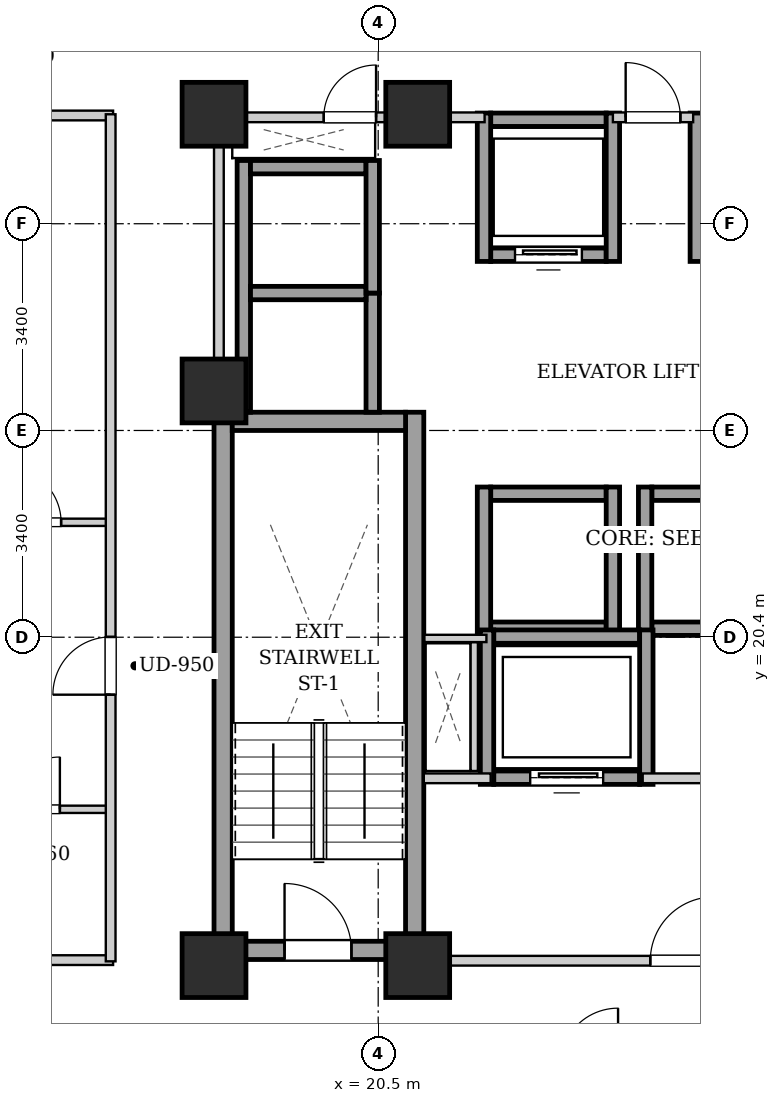
"""IFC4 building model, lengths in metres.
Left out: names, types, materials, properties, quantities, classifications, styles, units other than length and angle.
Written with IfcOpenShell. Run it as: python <this file> out.ifc"""

import sys

from ifc_helpers import new_model, si_unit, direction, frame, frame_2d, origin, origin_2d, place, context, subcontext, project, spatial, rectangle, extrude, element, fill, save


model = new_model("IFC4")
c1 = context("Model", 3, precision=1e-05, world=origin(), true_north=direction((0.0, 1.0)))
c2 = subcontext(c1, "Body", "Model", "MODEL_VIEW")
j1 = project(units=[si_unit("LENGTHUNIT", "METRE"), si_unit("PLANEANGLEUNIT", "RADIAN")], contexts=[c1])
p1 = place(None, origin())
s1 = spatial("IfcSite", under=j1, at=p1, CompositionType="ELEMENT")
p2 = place(p1, origin())
s2 = spatial("IfcBuilding", under=s1, at=p2, CompositionType="ELEMENT")
p3 = place(p2, frame((0.0, 0.0, 84.7)))
s3 = spatial("IfcBuildingStorey", under=s2, at=p3, CompositionType="ELEMENT", Elevation=84.7)
for number, where, z_axis, x_axis in (
    (1, (17.8, 15.0, 0.0), (0.0, 0.0, 1.0), (1.0, 0.0, 0.0)),
    (2, (21.15, 15.0, 0.0), (0.0, 0.0, 1.0), (1.0, 0.0, 0.0)),
    (3, (17.8, 29.0, 0.0), (0.0, 0.0, 1.0), (1.0, 0.0, 0.0)),
    (4, (21.15, 29.0, 0.0), (0.0, 0.0, 1.0), (1.0, 0.0, 0.0)),
    (5, (17.8, 24.45, 0.0), (0.0, 0.0, 1.0), (1.0, 0.0, 0.0)),
):
    element("IfcColumn", number, at=place(p3, frame(where, z_axis=z_axis, x_axis=x_axis)), inside=s3, PredefinedType="COLUMN", context=c2, shape_type="SweptSolid", body=[
        extrude(rectangle(XDim=1.05, YDim=1.05, at=origin_2d()), origin(), (0.0, 0.0, 1.0), 3.2),
    ])
for number, where, z_axis, x_axis in (
    (6, (17.95, 15.1, 0.0), (0.0, 0.0, 1.0), (0.0, 1.0, 0.0)),
    (7, (21.1, 15.1, 0.0), (0.0, 0.0, 1.0), (0.0, 1.0, 0.0)),
):
    element("IfcWall", number, at=place(p3, frame(where, z_axis=z_axis, x_axis=x_axis)), inside=s3, PredefinedType="SHEAR", context=c2, shape_type="SweptSolid", body=[
        extrude(rectangle(XDim=9.0, YDim=0.3, at=frame_2d((4.5, 0.0))), origin(), (0.0, 0.0, 1.0), 2.94),
    ])
p4 = place(p3, frame((18.1, 23.95, 0.0), z_axis=(0.0, 0.0, 1.0), x_axis=(1.0, 0.0, 0.0)))
e8 = element("IfcWall", 8, at=p4, inside=s3, PredefinedType="SHEAR", context=c2, shape_type="SweptSolid", body=[
    extrude(rectangle(XDim=2.85, YDim=0.3, at=frame_2d((1.425, 0.0))), origin(), (0.0, 0.0, 1.0), 2.94),
])
p5 = place(p3, frame((18.1, 15.25, 0.0), z_axis=(0.0, 0.0, 1.0), x_axis=(1.0, 0.0, 0.0)))
e9 = element("IfcWall", 9, at=p5, inside=s3, PredefinedType="SHEAR", context=c2, shape_type="SweptSolid", body=[
    extrude(rectangle(XDim=2.85, YDim=0.3, at=frame_2d((1.425, 0.0))), origin(), (0.0, 0.0, 1.0), 2.94),
])
p6 = place(p5, frame((0.86, 0.0, 0.0)))
e10 = element("IfcOpeningElement", 10, at=p6, cuts=e9, PredefinedType="OPENING", context=c2, shape_type="SweptSolid", body=[
    extrude(rectangle(XDim=1.1, YDim=2.05, at=frame_2d((0.55, 1.025))), frame((0.0, 0.16, 0.0), z_axis=(0.0, -1.0, 0.0), x_axis=(1.0, 0.0, 0.0)), (0.0, 0.0, 1.0), 0.32),
])
p7 = place(p3, frame((22.35, 26.69, 0.0), z_axis=(0.0, 0.0, 1.0), x_axis=(1.0, 0.0, 0.0)))
e11 = element("IfcWall", 11, at=p7, inside=s3, PredefinedType="SHEAR", context=c2, shape_type="SweptSolid", body=[
    extrude(rectangle(XDim=1.9, YDim=0.22, at=frame_2d((0.95, 0.0))), origin(), (0.0, 0.0, 1.0), 2.94),
])
p8 = place(p7, frame((0.4, 0.0, 0.0)))
e12 = element("IfcOpeningElement", 12, at=p8, cuts=e11, PredefinedType="OPENING", context=c2, shape_type="SweptSolid", body=[
    extrude(rectangle(XDim=1.1, YDim=2.15, at=frame_2d((0.55, 1.075))), frame((0.0, 0.12, 0.0), z_axis=(0.0, -1.0, 0.0), x_axis=(1.0, 0.0, 0.0)), (0.0, 0.0, 1.0), 0.24),
])
p9 = place(p3, frame((22.35, 28.91, 0.0), z_axis=(0.0, 0.0, 1.0), x_axis=(1.0, 0.0, 0.0)))
e13 = element("IfcWall", 13, at=p9, inside=s3, PredefinedType="SHEAR", context=c2, shape_type="SweptSolid", body=[
    extrude(rectangle(XDim=1.9, YDim=0.22, at=frame_2d((0.95, 0.0))), origin(), (0.0, 0.0, 1.0), 2.94),
])
for number, where, z_axis, x_axis in (
    (14, (22.24, 26.58, 0.0), (0.0, 0.0, 1.0), (0.0, 1.0, 0.0)),
    (15, (24.36, 26.58, 0.0), (0.0, 0.0, 1.0), (0.0, 1.0, 0.0)),
    (16, (25.74, 26.58, 0.0), (0.0, 0.0, 1.0), (0.0, 1.0, 0.0)),
):
    element("IfcWall", number, at=place(p3, frame(where, z_axis=z_axis, x_axis=x_axis)), inside=s3, PredefinedType="SHEAR", context=c2, shape_type="SweptSolid", body=[
        extrude(rectangle(XDim=2.44, YDim=0.22, at=frame_2d((1.22, 0.0))), origin(), (0.0, 0.0, 1.0), 2.94),
    ])
for number, where, z_axis, x_axis in (
    (17, (22.35, 20.54, 0.0), (0.0, 0.0, 1.0), (1.0, 0.0, 0.0)),
    (18, (22.35, 22.76, 0.0), (0.0, 0.0, 1.0), (1.0, 0.0, 0.0)),
):
    element("IfcWall", number, at=place(p3, frame(where, z_axis=z_axis, x_axis=x_axis)), inside=s3, PredefinedType="SHEAR", context=c2, shape_type="SweptSolid", body=[
        extrude(rectangle(XDim=1.9, YDim=0.22, at=frame_2d((0.95, 0.0))), origin(), (0.0, 0.0, 1.0), 2.94),
    ])
for number, where, z_axis, x_axis in (
    (19, (22.24, 20.43, 0.0), (0.0, 0.0, 1.0), (0.0, 1.0, 0.0)),
    (20, (24.36, 20.43, 0.0), (0.0, 0.0, 1.0), (0.0, 1.0, 0.0)),
):
    element("IfcWall", number, at=place(p3, frame(where, z_axis=z_axis, x_axis=x_axis)), inside=s3, PredefinedType="SHEAR", context=c2, shape_type="SweptSolid", body=[
        extrude(rectangle(XDim=2.44, YDim=0.22, at=frame_2d((1.22, 0.0))), origin(), (0.0, 0.0, 1.0), 2.94),
    ])
for number, where, z_axis, x_axis in (
    (21, (25.0, 20.54, 0.0), (0.0, 0.0, 1.0), (1.0, 0.0, 0.0)),
    (22, (25.0, 22.76, 0.0), (0.0, 0.0, 1.0), (1.0, 0.0, 0.0)),
):
    element("IfcWall", number, at=place(p3, frame(where, z_axis=z_axis, x_axis=x_axis)), inside=s3, PredefinedType="SHEAR", context=c2, shape_type="SweptSolid", body=[
        extrude(rectangle(XDim=1.9, YDim=0.22, at=frame_2d((0.95, 0.0))), origin(), (0.0, 0.0, 1.0), 2.94),
    ])
p10 = place(p3, frame((24.89, 20.43, 0.0), z_axis=(0.0, 0.0, 1.0), x_axis=(0.0, 1.0, 0.0)))
e23 = element("IfcWall", 23, at=p10, inside=s3, PredefinedType="SHEAR", context=c2, shape_type="SweptSolid", body=[
    extrude(rectangle(XDim=2.44, YDim=0.22, at=frame_2d((1.22, 0.0))), origin(), (0.0, 0.0, 1.0), 2.94),
])
p11 = place(p3, frame((18.29, 24.1, 0.0), z_axis=(0.0, 0.0, 1.0), x_axis=(0.0, 1.0, 0.0)))
e24 = element("IfcWall", 24, at=p11, inside=s3, PredefinedType="SHEAR", context=c2, shape_type="SweptSolid", body=[
    extrude(rectangle(XDim=4.14, YDim=0.22, at=frame_2d((2.07, 0.0))), origin(), (0.0, 0.0, 1.0), 2.94),
])
p12 = place(p3, frame((20.41, 24.1, 0.0), z_axis=(0.0, 0.0, 1.0), x_axis=(0.0, 1.0, 0.0)))
e25 = element("IfcWall", 25, at=p12, inside=s3, PredefinedType="SHEAR", context=c2, shape_type="SweptSolid", body=[
    extrude(rectangle(XDim=1.96, YDim=0.22, at=frame_2d((0.98, 0.0))), origin(), (0.0, 0.0, 1.0), 2.94),
])
for number, where, z_axis, x_axis in (
    (26, (18.4, 26.06, 0.0), (0.0, 0.0, 1.0), (1.0, 0.0, 0.0)),
    (27, (18.4, 28.13, 0.0), (0.0, 0.0, 1.0), (1.0, 0.0, 0.0)),
):
    element("IfcWall", number, at=place(p3, frame(where, z_axis=z_axis, x_axis=x_axis)), inside=s3, PredefinedType="SHEAR", context=c2, shape_type="SweptSolid", body=[
        extrude(rectangle(XDim=1.9, YDim=0.22, at=frame_2d((0.95, 0.0))), origin(), (0.0, 0.0, 1.0), 2.94),
    ])
p13 = place(p3, frame((20.41, 26.06, 0.0), z_axis=(0.0, 0.0, 1.0), x_axis=(0.0, 1.0, 0.0)))
e28 = element("IfcWall", 28, at=p13, inside=s3, PredefinedType="SHEAR", context=c2, shape_type="SweptSolid", body=[
    extrude(rectangle(XDim=2.18, YDim=0.22, at=frame_2d((1.09, 0.0))), origin(), (0.0, 0.0, 1.0), 2.94),
])
p14 = place(p3, frame((22.4, 18.09, 0.0), z_axis=(0.0, 0.0, 1.0), x_axis=(1.0, 0.0, 0.0)))
e29 = element("IfcWall", 29, at=p14, inside=s3, PredefinedType="SHEAR", context=c2, shape_type="SweptSolid", body=[
    extrude(rectangle(XDim=2.4, YDim=0.22, at=frame_2d((1.2, 0.0))), origin(), (0.0, 0.0, 1.0), 2.94),
])
p15 = place(p14, frame((0.6, 0.0, 0.0)))
e30 = element("IfcOpeningElement", 30, at=p15, cuts=e29, PredefinedType="OPENING", context=c2, shape_type="SweptSolid", body=[
    extrude(rectangle(XDim=1.2, YDim=2.15, at=frame_2d((0.6, 1.075))), frame((0.0, 0.12, 0.0), z_axis=(0.0, -1.0, 0.0), x_axis=(1.0, 0.0, 0.0)), (0.0, 0.0, 1.0), 0.24),
])
p16 = place(p3, frame((22.4, 20.41, 0.0), z_axis=(0.0, 0.0, 1.0), x_axis=(1.0, 0.0, 0.0)))
e31 = element("IfcWall", 31, at=p16, inside=s3, PredefinedType="SHEAR", context=c2, shape_type="SweptSolid", body=[
    extrude(rectangle(XDim=2.4, YDim=0.22, at=frame_2d((1.2, 0.0))), origin(), (0.0, 0.0, 1.0), 2.94),
])
for number, where, z_axis, x_axis in (
    (32, (22.29, 17.98, 0.0), (0.0, 0.0, 1.0), (0.0, 1.0, 0.0)),
    (33, (24.91, 17.98, 0.0), (0.0, 0.0, 1.0), (0.0, 1.0, 0.0)),
):
    element("IfcWall", number, at=place(p3, frame(where, z_axis=z_axis, x_axis=x_axis)), inside=s3, PredefinedType="SHEAR", context=c2, shape_type="SweptSolid", body=[
        extrude(rectangle(XDim=2.54, YDim=0.22, at=frame_2d((1.27, 0.0))), origin(), (0.0, 0.0, 1.0), 2.94),
    ])
p17 = place(p3, frame((21.25, 15.08, 0.0), z_axis=(0.0, 0.0, 1.0), x_axis=(1.0, 0.0, 0.0)))
e34 = element("IfcWall", 34, at=p17, inside=s3, PredefinedType="PARTITIONING", context=c2, shape_type="SweptSolid", body=[
    extrude(rectangle(XDim=8.5, YDim=0.16, at=frame_2d((4.25, 0.0))), origin(), (0.0, 0.0, 1.0), 2.309),
])
p18 = place(p17, frame((3.725, 0.0, 0.0)))
e35 = element("IfcOpeningElement", 35, at=p18, cuts=e34, PredefinedType="OPENING", context=c2, shape_type="SweptSolid", body=[
    extrude(rectangle(XDim=1.05, YDim=2.05, at=frame_2d((0.525, 1.025))), frame((0.0, 0.09, 0.0), z_axis=(0.0, -1.0, 0.0), x_axis=(1.0, 0.0, 0.0)), (0.0, 0.0, 1.0), 0.18),
])
p19 = place(p3, frame((21.25, 18.08, 0.0), z_axis=(0.0, 0.0, 1.0), x_axis=(1.0, 0.0, 0.0)))
e36 = element("IfcWall", 36, at=p19, inside=s3, PredefinedType="PARTITIONING", context=c2, shape_type="SweptSolid", body=[
    extrude(rectangle(XDim=1.1, YDim=0.16, at=frame_2d((0.55, 0.0))), origin(), (0.0, 0.0, 1.0), 2.94),
])
p20 = place(p3, frame((24.85, 18.08, 0.0), z_axis=(0.0, 0.0, 1.0), x_axis=(1.0, 0.0, 0.0)))
e37 = element("IfcWall", 37, at=p20, inside=s3, PredefinedType="PARTITIONING", context=c2, shape_type="SweptSolid", body=[
    extrude(rectangle(XDim=1.3, YDim=0.16, at=frame_2d((0.65, 0.0))), origin(), (0.0, 0.0, 1.0), 2.94),
])
p21 = place(p3, frame((17.88, 24.12, 0.0), z_axis=(0.0, 0.0, 1.0), x_axis=(0.0, 1.0, 0.0)))
e38 = element("IfcWall", 38, at=p21, inside=s3, PredefinedType="PARTITIONING", context=c2, shape_type="SweptSolid", body=[
    extrude(rectangle(XDim=4.76, YDim=0.16, at=frame_2d((2.38, 0.0))), origin(), (0.0, 0.0, 1.0), 2.94),
])
p22 = place(p3, frame((24.36, 28.95, 0.0), z_axis=(0.0, 0.0, 1.0), x_axis=(1.0, 0.0, 0.0)))
e39 = element("IfcWall", 39, at=p22, inside=s3, PredefinedType="PARTITIONING", context=c2, shape_type="SweptSolid", body=[
    extrude(rectangle(XDim=1.32, YDim=0.16, at=frame_2d((0.66, 0.0))), origin(), (0.0, 0.0, 1.0), 2.309),
])
p23 = place(p22, frame((0.21, 0.0, 0.0)))
e40 = element("IfcOpeningElement", 40, at=p23, cuts=e39, PredefinedType="OPENING", context=c2, shape_type="SweptSolid", body=[
    extrude(rectangle(XDim=0.9, YDim=2.05, at=frame_2d((0.45, 1.025))), frame((0.0, 0.09, 0.0), z_axis=(0.0, -1.0, 0.0), x_axis=(1.0, 0.0, 0.0)), (0.0, 0.0, 1.0), 0.18),
])
p24 = place(p3, frame((17.96, 28.95, 0.0), z_axis=(0.0, 0.0, 1.0), x_axis=(1.0, 0.0, 0.0)))
e41 = element("IfcWall", 41, at=p24, inside=s3, PredefinedType="PARTITIONING", context=c2, shape_type="SweptSolid", body=[
    extrude(rectangle(XDim=4.29, YDim=0.16, at=frame_2d((2.145, 0.0))), origin(), (0.0, 0.0, 1.0), 2.309),
])
p25 = place(p24, frame((1.645, 0.0, 0.0)))
e42 = element("IfcOpeningElement", 42, at=p25, cuts=e41, PredefinedType="OPENING", context=c2, shape_type="SweptSolid", body=[
    extrude(rectangle(XDim=0.86, YDim=2.05, at=frame_2d((0.43, 1.025))), frame((0.0, 0.09, 0.0), z_axis=(0.0, -1.0, 0.0), x_axis=(1.0, 0.0, 0.0)), (0.0, 0.0, 1.0), 0.18),
])
p26 = place(p3, frame((22.08, 18.2, 0.0), z_axis=(0.0, 0.0, 1.0), x_axis=(0.0, 1.0, 0.0)))
e43 = element("IfcWall", 43, at=p26, inside=s3, PredefinedType="PARTITIONING", context=c2, shape_type="SweptSolid", body=[
    extrude(rectangle(XDim=2.12, YDim=0.12, at=frame_2d((1.06, 0.0))), origin(), (0.0, 0.0, 1.0), 2.94),
])
p27 = place(p3, frame((22.28, 20.38, 0.0), z_axis=(0.0, 0.0, 1.0), x_axis=(-1.0, 0.0, 0.0)))
e44 = element("IfcWall", 44, at=p27, inside=s3, PredefinedType="PARTITIONING", context=c2, shape_type="SweptSolid", body=[
    extrude(rectangle(XDim=1.02, YDim=0.12, at=frame_2d((0.51, 0.0))), origin(), (0.0, 0.0, 1.0), 2.94),
])
for number, where, z_axis, x_axis in (
    (45, (7.78, 15.09, 0.0), (0.0, 0.0, 1.0), (1.0, 0.0, 0.0)),
    (46, (7.78, 28.98, 0.0), (0.0, 0.0, 1.0), (1.0, 0.0, 0.0)),
):
    element("IfcWall", number, at=place(p3, frame(where, z_axis=z_axis, x_axis=x_axis)), inside=s3, PredefinedType="PARTITIONING", context=c2, shape_type="SweptSolid", body=[
        extrude(rectangle(XDim=8.36, YDim=0.16, at=frame_2d((4.18, 0.0))), origin(), (0.0, 0.0, 1.0), 2.309),
    ])
p28 = place(p3, frame((13.61, 22.29, 0.0), z_axis=(0.0, 0.0, 1.0), x_axis=(1.0, 0.0, 0.0)))
e47 = element("IfcWall", 47, at=p28, inside=s3, PredefinedType="PARTITIONING", context=c2, shape_type="SweptSolid", body=[
    extrude(rectangle(XDim=2.45, YDim=0.12, at=frame_2d((1.225, 0.0))), origin(), (0.0, 0.0, 1.0), 2.94),
])
p29 = place(p28, frame((0.775, 0.0, 0.0)))
e48 = element("IfcOpeningElement", 48, at=p29, cuts=e47, PredefinedType="OPENING", context=c2, shape_type="SweptSolid", body=[
    extrude(rectangle(XDim=0.9, YDim=2.05, at=frame_2d((0.45, 1.025))), frame((0.0, 0.07, 0.0), z_axis=(0.0, -1.0, 0.0), x_axis=(1.0, 0.0, 0.0)), (0.0, 0.0, 1.0), 0.14),
])
p30 = place(p3, frame((13.61, 17.57, 0.0), z_axis=(0.0, 0.0, 1.0), x_axis=(1.0, 0.0, 0.0)))
e49 = element("IfcWall", 49, at=p30, inside=s3, PredefinedType="PARTITIONING", context=c2, shape_type="SweptSolid", body=[
    extrude(rectangle(XDim=2.45, YDim=0.12, at=frame_2d((1.225, 0.0))), origin(), (0.0, 0.0, 1.0), 2.94),
])
p31 = place(p30, frame((0.795, 0.0, 0.0)))
e50 = element("IfcOpeningElement", 50, at=p31, cuts=e49, PredefinedType="OPENING", context=c2, shape_type="SweptSolid", body=[
    extrude(rectangle(XDim=0.86, YDim=2.05, at=frame_2d((0.43, 1.025))), frame((0.0, 0.07, 0.0), z_axis=(0.0, -1.0, 0.0), x_axis=(1.0, 0.0, 0.0)), (0.0, 0.0, 1.0), 0.14),
])
p32 = place(p3, frame((16.1, 15.07, 0.0), z_axis=(0.0, 0.0, 1.0), x_axis=(0.0, 1.0, 0.0)))
e51 = element("IfcWall", 51, at=p32, inside=s3, PredefinedType="PARTITIONING", context=c2, shape_type="SweptSolid", body=[
    extrude(rectangle(XDim=13.93, YDim=0.16, at=frame_2d((6.965, 0.0))), origin(), (0.0, 0.0, 1.0), 2.94),
])
p33 = place(p32, frame((4.385, 0.0, 0.0)))
e52 = element("IfcOpeningElement", 52, at=p33, cuts=e51, PredefinedType="OPENING", context=c2, shape_type="SweptSolid", body=[
    extrude(rectangle(XDim=0.95, YDim=2.1, at=frame_2d((0.475, 1.05))), frame((0.0, 0.09, 0.0), z_axis=(0.0, -1.0, 0.0), x_axis=(1.0, 0.0, 0.0)), (0.0, 0.0, 1.0), 0.18),
])
p34 = place(p6, origin())
e53 = element("IfcDoor", 53, at=p34, inside=s3, OperationType="SINGLE_SWING_LEFT", PredefinedType="DOOR", context=c2, shape_type="SweptSolid", body=[
    extrude(rectangle(XDim=1.1, YDim=2.05, at=frame_2d((0.55, 1.025))), frame((0.0, 0.025, 0.0), z_axis=(0.0, -1.0, 0.0), x_axis=(1.0, 0.0, 0.0)), (0.0, 0.0, 1.0), 0.05),
])
fill(e10, e53)
p35 = place(p8, origin())
e54 = element("IfcDoor", 54, at=p35, inside=s3, OperationType="SLIDING_TO_LEFT", PredefinedType="DOOR", context=c2, shape_type="SweptSolid", body=[
    extrude(rectangle(XDim=1.1, YDim=2.15, at=frame_2d((0.55, 1.075))), frame((0.0, 0.025, 0.0), z_axis=(0.0, -1.0, 0.0), x_axis=(1.0, 0.0, 0.0)), (0.0, 0.0, 1.0), 0.05),
])
fill(e12, e54)
p36 = place(p15, origin())
e55 = element("IfcDoor", 55, at=p36, inside=s3, OperationType="SLIDING_TO_LEFT", PredefinedType="DOOR", context=c2, shape_type="SweptSolid", body=[
    extrude(rectangle(XDim=1.2, YDim=2.15, at=frame_2d((0.6, 1.075))), frame((0.0, 0.025, 0.0), z_axis=(0.0, -1.0, 0.0), x_axis=(1.0, 0.0, 0.0)), (0.0, 0.0, 1.0), 0.05),
])
fill(e30, e55)
p37 = place(p18, origin())
e56 = element("IfcDoor", 56, at=p37, inside=s3, OperationType="SINGLE_SWING_RIGHT", PredefinedType="DOOR", context=c2, shape_type="SweptSolid", body=[
    extrude(rectangle(XDim=1.05, YDim=2.05, at=frame_2d((0.525, 1.025))), frame((0.0, 0.025, 0.0), z_axis=(0.0, -1.0, 0.0), x_axis=(1.0, 0.0, 0.0)), (0.0, 0.0, 1.0), 0.05),
])
fill(e35, e56)
p38 = place(p23, origin())
e57 = element("IfcDoor", 57, at=p38, inside=s3, OperationType="SINGLE_SWING_LEFT", PredefinedType="DOOR", context=c2, shape_type="SweptSolid", body=[
    extrude(rectangle(XDim=0.9, YDim=2.05, at=frame_2d((0.45, 1.025))), frame((0.0, 0.025, 0.0), z_axis=(0.0, -1.0, 0.0), x_axis=(1.0, 0.0, 0.0)), (0.0, 0.0, 1.0), 0.05),
])
fill(e40, e57)
p39 = place(p25, origin())
e58 = element("IfcDoor", 58, at=p39, inside=s3, OperationType="SINGLE_SWING_RIGHT", PredefinedType="DOOR", context=c2, shape_type="SweptSolid", body=[
    extrude(rectangle(XDim=0.86, YDim=2.05, at=frame_2d((0.43, 1.025))), frame((0.0, 0.025, 0.0), z_axis=(0.0, -1.0, 0.0), x_axis=(1.0, 0.0, 0.0)), (0.0, 0.0, 1.0), 0.05),
])
fill(e42, e58)
p40 = place(p29, origin())
e59 = element("IfcDoor", 59, at=p40, inside=s3, OperationType="SINGLE_SWING_LEFT", PredefinedType="DOOR", context=c2, shape_type="SweptSolid", body=[
    extrude(rectangle(XDim=0.9, YDim=2.05, at=frame_2d((0.45, 1.025))), frame((0.0, 0.025, 0.0), z_axis=(0.0, -1.0, 0.0), x_axis=(1.0, 0.0, 0.0)), (0.0, 0.0, 1.0), 0.05),
])
fill(e48, e59)
p41 = place(p31, origin())
e60 = element("IfcDoor", 60, at=p41, inside=s3, OperationType="SINGLE_SWING_RIGHT", PredefinedType="DOOR", context=c2, shape_type="SweptSolid", body=[
    extrude(rectangle(XDim=0.86, YDim=2.05, at=frame_2d((0.43, 1.025))), frame((0.0, 0.025, 0.0), z_axis=(0.0, -1.0, 0.0), x_axis=(1.0, 0.0, 0.0)), (0.0, 0.0, 1.0), 0.05),
])
fill(e50, e60)
p42 = place(p33, origin())
e61 = element("IfcDoor", 61, at=p42, inside=s3, OperationType="SINGLE_SWING_LEFT", PredefinedType="DOOR", context=c2, shape_type="SweptSolid", body=[
    extrude(rectangle(XDim=0.95, YDim=2.1, at=frame_2d((0.475, 1.05))), frame((0.0, 0.025, 0.0), z_axis=(0.0, -1.0, 0.0), x_axis=(1.0, 0.0, 0.0)), (0.0, 0.0, 1.0), 0.05),
])
fill(e52, e61)
save(model, sys.argv[1])
